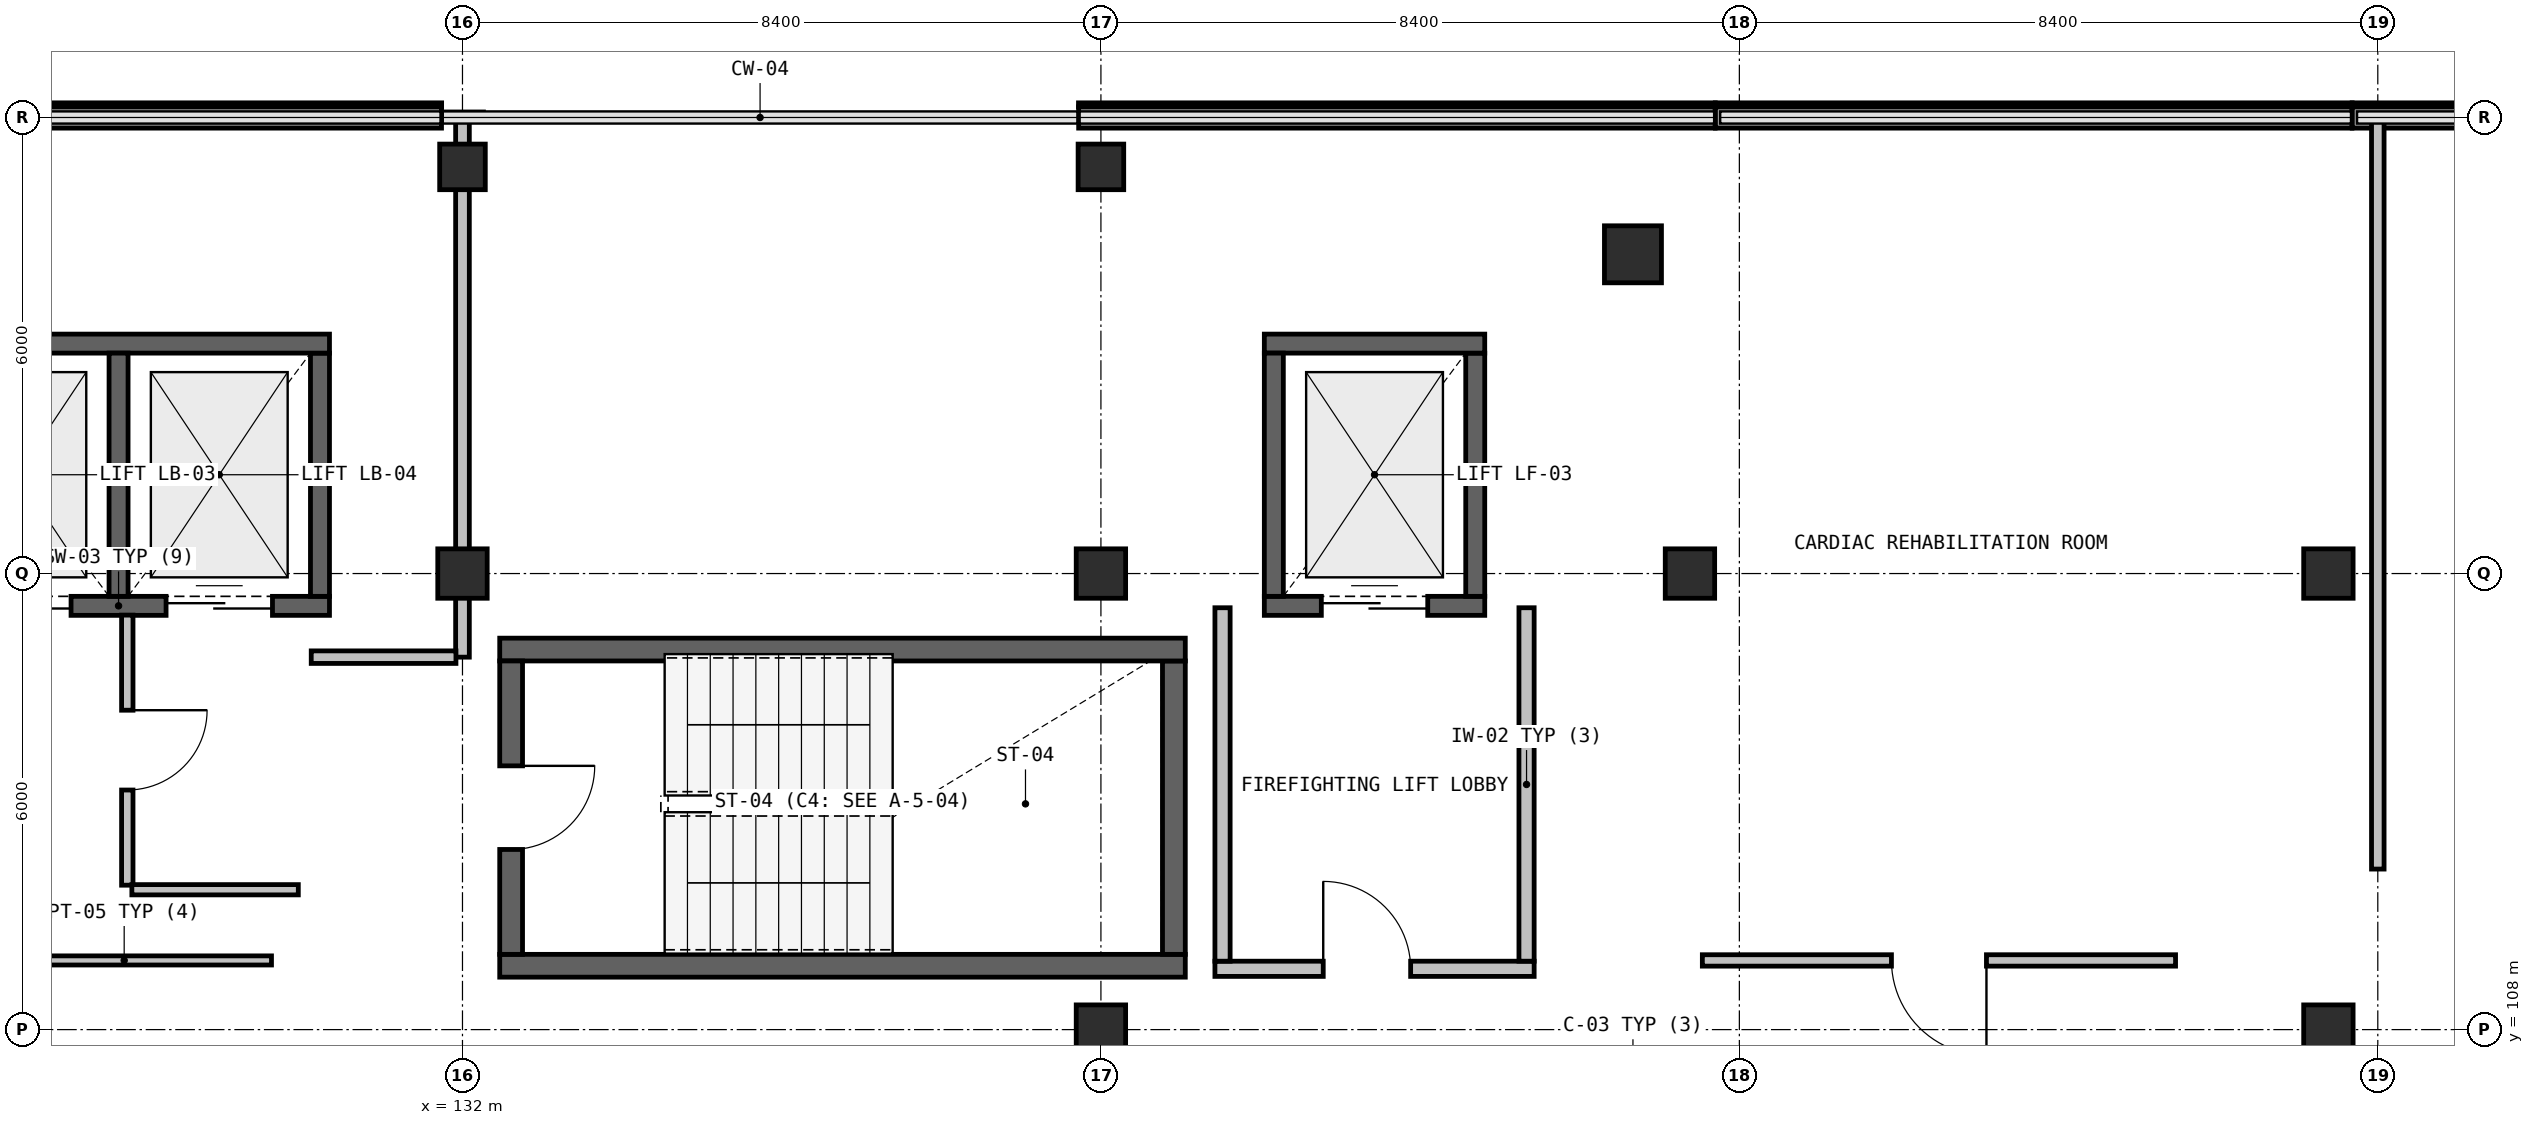
"""IFC4 building model, lengths in metres.
Left out: names, types, materials, properties, quantities, classifications, styles, units other than length and angle.
Written with IfcOpenShell. Run it as: python <this file> out.ifc"""

import sys

from ifc_helpers import new_model, si_unit, direction, frame, frame_2d, origin, origin_2d, place, context, subcontext, project, spatial, rectangle, extrude, element, fill, save


model = new_model("IFC4")
c1 = context("Model", 3, precision=1e-05, world=origin(), true_north=direction((0.0, 1.0)))
c2 = subcontext(c1, "Body", "Model", "MODEL_VIEW")
j1 = project(units=[si_unit("LENGTHUNIT", "METRE"), si_unit("PLANEANGLEUNIT", "RADIAN")], contexts=[c1])
p1 = place(None, origin())
s1 = spatial("IfcSite", under=j1, at=p1, CompositionType="ELEMENT")
p2 = place(p1, origin())
s2 = spatial("IfcBuilding", under=s1, at=p2, CompositionType="ELEMENT")
p3 = place(p2, frame((0.0, 0.0, 27.3)))
s3 = spatial("IfcBuildingStorey", under=s2, at=p3, CompositionType="ELEMENT", Elevation=27.3)
p4 = place(p3, frame((147.4, 118.2, 0.0), z_axis=(0.0, 0.0, 1.0), x_axis=(1.0, 0.0, 0.0)))
e1 = element("IfcColumn", 1, at=p4, inside=s3, PredefinedType="COLUMN", context=c2, shape_type="SweptSolid", body=[
    extrude(rectangle(XDim=0.75, YDim=0.75, at=origin_2d()), origin(), (0.0, 0.0, 1.0), 4.05),
])
p5 = place(p3, frame((132.0, 114.0, 0.0), z_axis=(0.0, 0.0, 1.0), x_axis=(1.0, 0.0, 0.0)))
e2 = element("IfcColumn", 2, at=p5, inside=s3, PredefinedType="COLUMN", context=c2, shape_type="SweptSolid", body=[
    extrude(rectangle(XDim=0.65, YDim=0.65, at=origin_2d()), origin(), (0.0, 0.0, 1.0), 4.05),
])
p6 = place(p3, frame((132.0, 119.35, 0.0), z_axis=(0.0, 0.0, 1.0), x_axis=(1.0, 0.0, 0.0)))
e3 = element("IfcColumn", 3, at=p6, inside=s3, PredefinedType="COLUMN", context=c2, shape_type="SweptSolid", body=[
    extrude(rectangle(XDim=0.6, YDim=0.6, at=origin_2d()), origin(), (0.0, 0.0, 1.0), 4.05),
])
for number, where, z_axis, x_axis in (
    (4, (140.4, 108.0, 0.0), (0.0, 0.0, 1.0), (1.0, 0.0, 0.0)),
    (5, (140.4, 114.0, 0.0), (0.0, 0.0, 1.0), (1.0, 0.0, 0.0)),
):
    element("IfcColumn", number, at=place(p3, frame(where, z_axis=z_axis, x_axis=x_axis)), inside=s3, PredefinedType="COLUMN", context=c2, shape_type="SweptSolid", body=[
        extrude(rectangle(XDim=0.65, YDim=0.65, at=origin_2d()), origin(), (0.0, 0.0, 1.0), 4.05),
    ])
p7 = place(p3, frame((140.4, 119.35, 0.0), z_axis=(0.0, 0.0, 1.0), x_axis=(1.0, 0.0, 0.0)))
e6 = element("IfcColumn", 6, at=p7, inside=s3, PredefinedType="COLUMN", context=c2, shape_type="SweptSolid", body=[
    extrude(rectangle(XDim=0.6, YDim=0.6, at=origin_2d()), origin(), (0.0, 0.0, 1.0), 4.05),
])
for number, where, z_axis, x_axis in (
    (7, (148.15, 114.0, 0.0), (0.0, 0.0, 1.0), (1.0, 0.0, 0.0)),
    (8, (156.55, 108.0, 0.0), (0.0, 0.0, 1.0), (1.0, 0.0, 0.0)),
    (9, (156.55, 114.0, 0.0), (0.0, 0.0, 1.0), (1.0, 0.0, 0.0)),
):
    element("IfcColumn", number, at=place(p3, frame(where, z_axis=z_axis, x_axis=x_axis)), inside=s3, PredefinedType="COLUMN", context=c2, shape_type="SweptSolid", body=[
        extrude(rectangle(XDim=0.65, YDim=0.65, at=origin_2d()), origin(), (0.0, 0.0, 1.0), 4.05),
    ])
p8 = place(p3, frame((123.349, 120.0, 0.0), z_axis=(0.0, 0.0, 1.0), x_axis=(1.0, 0.0, 0.0)))
e10 = element("IfcWall", 10, at=p8, inside=s3, PredefinedType="SOLIDWALL", context=c2, shape_type="SweptSolid", body=[
    extrude(rectangle(XDim=8.375, YDim=0.28, at=frame_2d((4.188, 0.0))), origin(), (0.0, 0.0, 1.0), 0.94),
])
p9 = place(p3, frame((140.107, 120.0, 0.0), z_axis=(0.0, 0.0, 1.0), x_axis=(1.0, 0.0, 0.0)))
e11 = element("IfcWall", 11, at=p9, inside=s3, PredefinedType="SOLIDWALL", context=c2, shape_type="SweptSolid", body=[
    extrude(rectangle(XDim=8.374, YDim=0.28, at=frame_2d((4.187, 0.0))), origin(), (0.0, 0.0, 1.0), 0.94),
])
for number, where, z_axis, x_axis in (
    (12, (148.485, 120.0, 0.0), (0.0, 0.0, 1.0), (1.0, 0.0, 0.0)),
    (13, (156.864, 120.0, 0.0), (0.0, 0.0, 1.0), (1.0, 0.0, 0.0)),
):
    element("IfcWall", number, at=place(p3, frame(where, z_axis=z_axis, x_axis=x_axis)), inside=s3, PredefinedType="SOLIDWALL", context=c2, shape_type="SweptSolid", body=[
        extrude(rectangle(XDim=8.375, YDim=0.28, at=frame_2d((4.188, 0.0))), origin(), (0.0, 0.0, 1.0), 0.94),
    ])
p10 = place(p3, frame((132.49, 108.84, 0.0), z_axis=(0.0, 0.0, 1.0), x_axis=(1.0, 0.0, 0.0)))
e14 = element("IfcWall", 14, at=p10, inside=s3, PredefinedType="SHEAR", context=c2, shape_type="SweptSolid", body=[
    extrude(rectangle(XDim=9.02, YDim=0.3, at=frame_2d((4.51, 0.0))), origin(), (0.0, 0.0, 1.0), 3.78),
])
p11 = place(p3, frame((141.36, 108.99, 0.0), z_axis=(0.0, 0.0, 1.0), x_axis=(0.0, 1.0, 0.0)))
e15 = element("IfcWall", 15, at=p11, inside=s3, PredefinedType="SHEAR", context=c2, shape_type="SweptSolid", body=[
    extrude(rectangle(XDim=3.86, YDim=0.3, at=frame_2d((1.93, 0.0))), origin(), (0.0, 0.0, 1.0), 3.78),
])
p12 = place(p3, frame((141.51, 113.0, 0.0), z_axis=(0.0, 0.0, 1.0), x_axis=(-1.0, 0.0, 0.0)))
e16 = element("IfcWall", 16, at=p12, inside=s3, PredefinedType="SHEAR", context=c2, shape_type="SweptSolid", body=[
    extrude(rectangle(XDim=9.02, YDim=0.3, at=frame_2d((4.51, 0.0))), origin(), (0.0, 0.0, 1.0), 3.78),
])
p13 = place(p3, frame((132.64, 112.85, 0.0), z_axis=(0.0, 0.0, 1.0), x_axis=(0.0, -1.0, 0.0)))
e17 = element("IfcWall", 17, at=p13, inside=s3, PredefinedType="SHEAR", context=c2, shape_type="SweptSolid", body=[
    extrude(rectangle(XDim=3.86, YDim=0.3, at=frame_2d((1.93, 0.0))), origin(), (0.0, 0.0, 1.0), 3.78),
])
p14 = place(p13, frame((1.38, 0.0, 0.0)))
e18 = element("IfcOpeningElement", 18, at=p14, cuts=e17, PredefinedType="OPENING", context=c2, shape_type="SweptSolid", body=[
    extrude(rectangle(XDim=1.1, YDim=2.15, at=frame_2d((0.55, 1.075))), frame((0.0, 0.16, 0.0), z_axis=(0.0, -1.0, 0.0), x_axis=(1.0, 0.0, 0.0)), (0.0, 0.0, 1.0), 0.32),
])
p15 = place(p3, frame((141.9, 108.8, 0.0), z_axis=(0.0, 0.0, 1.0), x_axis=(1.0, 0.0, 0.0)))
e19 = element("IfcWall", 19, at=p15, inside=s3, PredefinedType="SOLIDWALL", context=c2, shape_type="SweptSolid", body=[
    extrude(rectangle(XDim=4.2, YDim=0.2, at=frame_2d((2.1, 0.0))), origin(), (0.0, 0.0, 1.0), 3.78),
])
p16 = place(p15, frame((1.425, 0.0, 0.0)))
e20 = element("IfcOpeningElement", 20, at=p16, cuts=e19, PredefinedType="OPENING", context=c2, shape_type="SweptSolid", body=[
    extrude(rectangle(XDim=1.15, YDim=2.15, at=frame_2d((0.575, 1.075))), frame((0.0, 0.11, 0.0), z_axis=(0.0, -1.0, 0.0), x_axis=(1.0, 0.0, 0.0)), (0.0, 0.0, 1.0), 0.22),
])
for number, where, z_axis, x_axis in (
    (21, (146.0, 108.9, 0.0), (0.0, 0.0, 1.0), (0.0, 1.0, 0.0)),
    (22, (142.0, 113.55, 0.0), (0.0, 0.0, 1.0), (0.0, -1.0, 0.0)),
):
    element("IfcWall", number, at=place(p3, frame(where, z_axis=z_axis, x_axis=x_axis)), inside=s3, PredefinedType="SOLIDWALL", context=c2, shape_type="SweptSolid", body=[
        extrude(rectangle(XDim=4.65, YDim=0.2, at=frame_2d((2.325, 0.0))), origin(), (0.0, 0.0, 1.0), 3.78),
    ])
p17 = place(p3, frame((124.7, 113.575, 0.0), z_axis=(0.0, 0.0, 1.0), x_axis=(1.0, 0.0, 0.0)))
e23 = element("IfcWall", 23, at=p17, inside=s3, PredefinedType="SHEAR", context=c2, shape_type="SweptSolid", body=[
    extrude(rectangle(XDim=5.55, YDim=0.25, at=frame_2d((2.775, 0.0))), origin(), (0.0, 0.0, 1.0), 3.78),
])
p18 = place(p17, frame((0.75, 0.0, 0.0)))
e24 = element("IfcOpeningElement", 24, at=p18, cuts=e23, PredefinedType="OPENING", context=c2, shape_type="SweptSolid", body=[
    extrude(rectangle(XDim=1.4, YDim=2.2, at=frame_2d((0.7, 1.1))), frame((0.0, 0.135, 0.0), z_axis=(0.0, -1.0, 0.0), x_axis=(1.0, 0.0, 0.0)), (0.0, 0.0, 1.0), 0.27),
])
p19 = place(p17, frame((3.4, 0.0, 0.0)))
e25 = element("IfcOpeningElement", 25, at=p19, cuts=e23, PredefinedType="OPENING", context=c2, shape_type="SweptSolid", body=[
    extrude(rectangle(XDim=1.4, YDim=2.2, at=frame_2d((0.7, 1.1))), frame((0.0, 0.135, 0.0), z_axis=(0.0, -1.0, 0.0), x_axis=(1.0, 0.0, 0.0)), (0.0, 0.0, 1.0), 0.27),
])
p20 = place(p3, frame((130.125, 113.7, 0.0), z_axis=(0.0, 0.0, 1.0), x_axis=(0.0, 1.0, 0.0)))
e26 = element("IfcWall", 26, at=p20, inside=s3, PredefinedType="SHEAR", context=c2, shape_type="SweptSolid", body=[
    extrude(rectangle(XDim=3.2, YDim=0.25, at=frame_2d((1.6, 0.0))), origin(), (0.0, 0.0, 1.0), 3.78),
])
p21 = place(p3, frame((130.25, 117.025, 0.0), z_axis=(0.0, 0.0, 1.0), x_axis=(-1.0, 0.0, 0.0)))
e27 = element("IfcWall", 27, at=p21, inside=s3, PredefinedType="SHEAR", context=c2, shape_type="SweptSolid", body=[
    extrude(rectangle(XDim=5.55, YDim=0.25, at=frame_2d((2.775, 0.0))), origin(), (0.0, 0.0, 1.0), 3.78),
])
p22 = place(p3, frame((127.475, 113.7, 0.0), z_axis=(0.0, 0.0, 1.0), x_axis=(0.0, 1.0, 0.0)))
e28 = element("IfcWall", 28, at=p22, inside=s3, PredefinedType="SHEAR", context=c2, shape_type="SweptSolid", body=[
    extrude(rectangle(XDim=3.2, YDim=0.25, at=frame_2d((1.6, 0.0))), origin(), (0.0, 0.0, 1.0), 3.78),
])
p23 = place(p3, frame((142.55, 113.575, 0.0), z_axis=(0.0, 0.0, 1.0), x_axis=(1.0, 0.0, 0.0)))
e29 = element("IfcWall", 29, at=p23, inside=s3, PredefinedType="SHEAR", context=c2, shape_type="SweptSolid", body=[
    extrude(rectangle(XDim=2.9, YDim=0.25, at=frame_2d((1.45, 0.0))), origin(), (0.0, 0.0, 1.0), 3.78),
])
p24 = place(p23, frame((0.75, 0.0, 0.0)))
e30 = element("IfcOpeningElement", 30, at=p24, cuts=e29, PredefinedType="OPENING", context=c2, shape_type="SweptSolid", body=[
    extrude(rectangle(XDim=1.4, YDim=2.15, at=frame_2d((0.7, 1.075))), frame((0.0, 0.135, 0.0), z_axis=(0.0, -1.0, 0.0), x_axis=(1.0, 0.0, 0.0)), (0.0, 0.0, 1.0), 0.27),
])
p25 = place(p3, frame((145.325, 113.7, 0.0), z_axis=(0.0, 0.0, 1.0), x_axis=(0.0, 1.0, 0.0)))
e31 = element("IfcWall", 31, at=p25, inside=s3, PredefinedType="SHEAR", context=c2, shape_type="SweptSolid", body=[
    extrude(rectangle(XDim=3.2, YDim=0.25, at=frame_2d((1.6, 0.0))), origin(), (0.0, 0.0, 1.0), 3.78),
])
p26 = place(p3, frame((145.45, 117.025, 0.0), z_axis=(0.0, 0.0, 1.0), x_axis=(-1.0, 0.0, 0.0)))
e32 = element("IfcWall", 32, at=p26, inside=s3, PredefinedType="SHEAR", context=c2, shape_type="SweptSolid", body=[
    extrude(rectangle(XDim=2.9, YDim=0.25, at=frame_2d((1.45, 0.0))), origin(), (0.0, 0.0, 1.0), 3.78),
])
p27 = place(p3, frame((142.675, 116.9, 0.0), z_axis=(0.0, 0.0, 1.0), x_axis=(0.0, -1.0, 0.0)))
e33 = element("IfcWall", 33, at=p27, inside=s3, PredefinedType="SHEAR", context=c2, shape_type="SweptSolid", body=[
    extrude(rectangle(XDim=3.2, YDim=0.25, at=frame_2d((1.6, 0.0))), origin(), (0.0, 0.0, 1.0), 3.78),
])
p28 = place(p3, frame((132.0, 119.989, 0.0), z_axis=(0.0, 0.0, 1.0), x_axis=(0.0, -1.0, 0.0)))
e34 = element("IfcWall", 34, at=p28, inside=s3, PredefinedType="PARTITIONING", context=c2, shape_type="SweptSolid", body=[
    extrude(rectangle(XDim=7.089, YDim=0.18, at=frame_2d((3.544, 0.0))), origin(), (0.0, 0.0, 1.0), 3.18),
])
p29 = place(p3, frame((131.914, 112.9, 0.0), z_axis=(0.0, 0.0, 1.0), x_axis=(-1.0, 0.0, 0.0)))
e35 = element("IfcWall", 35, at=p29, inside=s3, PredefinedType="PARTITIONING", context=c2, shape_type="SweptSolid", body=[
    extrude(rectangle(XDim=1.904, YDim=0.165, at=frame_2d((0.952, 0.0))), origin(), (0.0, 0.0, 1.0), 3.78),
])
p30 = place(p3, frame((127.59, 113.453, 0.0), z_axis=(0.0, 0.0, 1.0), x_axis=(0.0, -1.0, 0.0)))
e36 = element("IfcWall", 36, at=p30, inside=s3, PredefinedType="PARTITIONING", context=c2, shape_type="SweptSolid", body=[
    extrude(rectangle(XDim=3.553, YDim=0.15, at=frame_2d((1.776, 0.0))), origin(), (0.0, 0.0, 1.0), 3.78),
])
p31 = place(p30, frame((1.251, 0.0, 0.0)))
e37 = element("IfcOpeningElement", 37, at=p31, cuts=e36, PredefinedType="OPENING", context=c2, shape_type="SweptSolid", body=[
    extrude(rectangle(XDim=1.05, YDim=2.15, at=frame_2d((0.525, 1.075))), frame((0.0, 0.085, 0.0), z_axis=(0.0, -1.0, 0.0), x_axis=(1.0, 0.0, 0.0)), (0.0, 0.0, 1.0), 0.17),
])
p32 = place(p3, frame((127.65, 109.84, 0.0), z_axis=(0.0, 0.0, 1.0), x_axis=(1.0, 0.0, 0.0)))
e38 = element("IfcWall", 38, at=p32, inside=s3, PredefinedType="PARTITIONING", context=c2, shape_type="SweptSolid", body=[
    extrude(rectangle(XDim=2.19, YDim=0.135, at=frame_2d((1.095, 0.0))), origin(), (0.0, 0.0, 1.0), 3.78),
])
p33 = place(p3, frame((129.487, 108.91, 0.0), z_axis=(0.0, 0.0, 1.0), x_axis=(-1.0, 0.0, 0.0)))
e39 = element("IfcWall", 39, at=p33, inside=s3, PredefinedType="PARTITIONING", context=c2, shape_type="SweptSolid", body=[
    extrude(rectangle(XDim=3.876, YDim=0.12, at=frame_2d((1.938, 0.0))), origin(), (0.0, 0.0, 1.0), 3.78),
])
p34 = place(p3, frame((157.2, 119.958, 0.0), z_axis=(0.0, 0.0, 1.0), x_axis=(0.0, -1.0, 0.0)))
e40 = element("IfcWall", 40, at=p34, inside=s3, PredefinedType="PARTITIONING", context=c2, shape_type="SweptSolid", body=[
    extrude(rectangle(XDim=9.846, YDim=0.165, at=frame_2d((4.923, 0.0))), origin(), (0.0, 0.0, 1.0), 3.78),
])
p35 = place(p3, frame((154.539, 108.91, 0.0), z_axis=(0.0, 0.0, 1.0), x_axis=(-1.0, 0.0, 0.0)))
e41 = element("IfcWall", 41, at=p35, inside=s3, PredefinedType="PARTITIONING", context=c2, shape_type="SweptSolid", body=[
    extrude(rectangle(XDim=6.226, YDim=0.15, at=frame_2d((3.113, 0.0))), origin(), (0.0, 0.0, 1.0), 3.78),
])
p36 = place(p35, frame((2.488, 0.0, 0.0)))
e42 = element("IfcOpeningElement", 42, at=p36, cuts=e41, PredefinedType="OPENING", context=c2, shape_type="SweptSolid", body=[
    extrude(rectangle(XDim=1.25, YDim=2.15, at=frame_2d((0.625, 1.075))), frame((0.0, 0.085, 0.0), z_axis=(0.0, -1.0, 0.0), x_axis=(1.0, 0.0, 0.0)), (0.0, 0.0, 1.0), 0.17),
])
p37 = place(p14, origin())
e43 = element("IfcDoor", 43, at=p37, inside=s3, OperationType="SINGLE_SWING_LEFT", PredefinedType="DOOR", context=c2, shape_type="SweptSolid", body=[
    extrude(rectangle(XDim=1.1, YDim=2.15, at=frame_2d((0.55, 1.075))), frame((0.0, 0.025, 0.0), z_axis=(0.0, -1.0, 0.0), x_axis=(1.0, 0.0, 0.0)), (0.0, 0.0, 1.0), 0.05),
])
fill(e18, e43)
p38 = place(p16, origin())
e44 = element("IfcDoor", 44, at=p38, inside=s3, OperationType="SINGLE_SWING_RIGHT", PredefinedType="DOOR", context=c2, shape_type="SweptSolid", body=[
    extrude(rectangle(XDim=1.15, YDim=2.15, at=frame_2d((0.575, 1.075))), frame((0.0, 0.025, 0.0), z_axis=(0.0, -1.0, 0.0), x_axis=(1.0, 0.0, 0.0)), (0.0, 0.0, 1.0), 0.05),
])
fill(e20, e44)
p39 = place(p18, origin())
e45 = element("IfcDoor", 45, at=p39, inside=s3, OperationType="DOUBLE_DOOR_SLIDING", PredefinedType="DOOR", context=c2, shape_type="SweptSolid", body=[
    extrude(rectangle(XDim=1.4, YDim=2.2, at=frame_2d((0.7, 1.1))), frame((0.0, 0.025, 0.0), z_axis=(0.0, -1.0, 0.0), x_axis=(1.0, 0.0, 0.0)), (0.0, 0.0, 1.0), 0.05),
])
fill(e24, e45)
p40 = place(p19, origin())
e46 = element("IfcDoor", 46, at=p40, inside=s3, OperationType="DOUBLE_DOOR_SLIDING", PredefinedType="DOOR", context=c2, shape_type="SweptSolid", body=[
    extrude(rectangle(XDim=1.4, YDim=2.2, at=frame_2d((0.7, 1.1))), frame((0.0, 0.025, 0.0), z_axis=(0.0, -1.0, 0.0), x_axis=(1.0, 0.0, 0.0)), (0.0, 0.0, 1.0), 0.05),
])
fill(e25, e46)
p41 = place(p24, origin())
e47 = element("IfcDoor", 47, at=p41, inside=s3, OperationType="DOUBLE_DOOR_SLIDING", PredefinedType="DOOR", context=c2, shape_type="SweptSolid", body=[
    extrude(rectangle(XDim=1.4, YDim=2.15, at=frame_2d((0.7, 1.075))), frame((0.0, 0.025, 0.0), z_axis=(0.0, -1.0, 0.0), x_axis=(1.0, 0.0, 0.0)), (0.0, 0.0, 1.0), 0.05),
])
fill(e30, e47)
p42 = place(p31, origin())
e48 = element("IfcDoor", 48, at=p42, inside=s3, OperationType="SINGLE_SWING_RIGHT", PredefinedType="DOOR", context=c2, shape_type="SweptSolid", body=[
    extrude(rectangle(XDim=1.05, YDim=2.15, at=frame_2d((0.525, 1.075))), frame((0.0, 0.025, 0.0), z_axis=(0.0, -1.0, 0.0), x_axis=(1.0, 0.0, 0.0)), (0.0, 0.0, 1.0), 0.05),
])
fill(e37, e48)
p43 = place(p36, origin())
e49 = element("IfcDoor", 49, at=p43, inside=s3, OperationType="SINGLE_SWING_LEFT", PredefinedType="DOOR", context=c2, shape_type="SweptSolid", body=[
    extrude(rectangle(XDim=1.25, YDim=2.15, at=frame_2d((0.625, 1.075))), frame((0.0, 0.025, 0.0), z_axis=(0.0, -1.0, 0.0), x_axis=(1.0, 0.0, 0.0)), (0.0, 0.0, 1.0), 0.05),
])
fill(e42, e49)
save(model, sys.argv[1])
